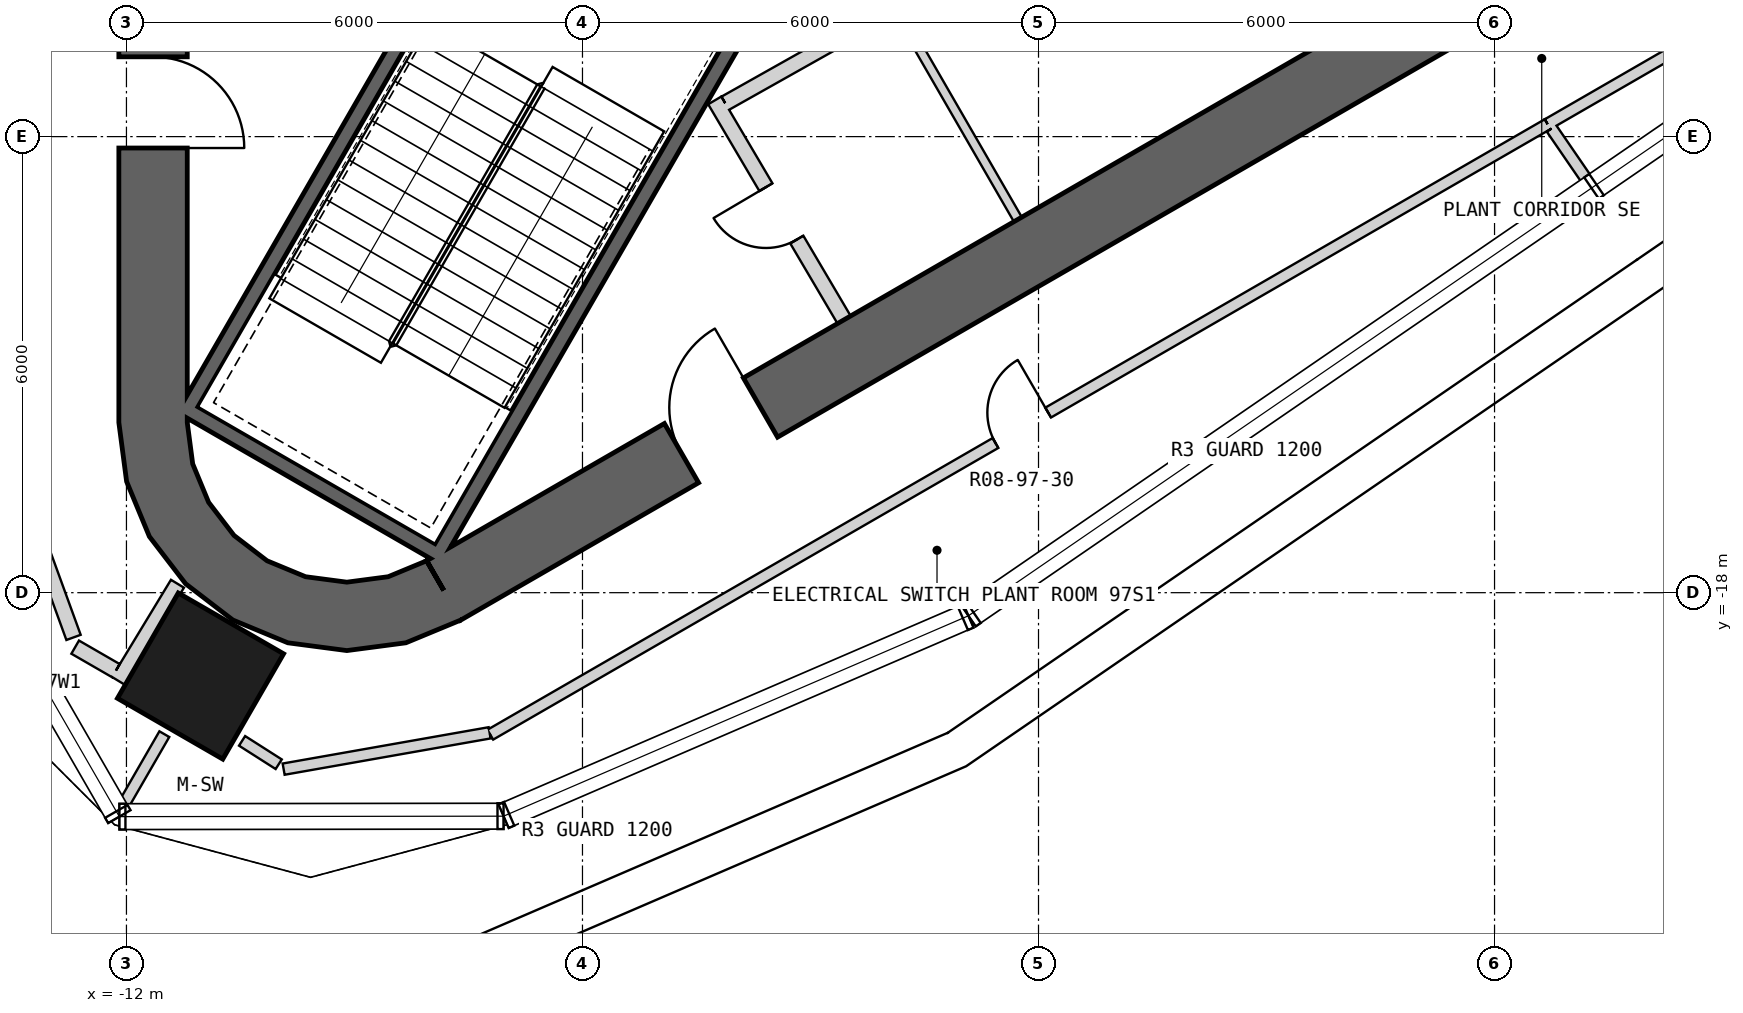
"""IFC4 building model, lengths in metres.
Left out: names, types, materials, properties, quantities, classifications, styles, units other than length and angle.
Written with IfcOpenShell. Run it as: python <this file> out.ifc"""

import sys

from ifc_helpers import new_model, si_unit, direction, frame, frame_2d, origin, origin_2d, place, context, subcontext, project, spatial, polyline, rectangle, outline, extrude, element, fill, save


model = new_model("IFC4")
c1 = context("Model", 3, precision=1e-05, world=origin(), true_north=direction((0.0, 1.0)))
c2 = subcontext(c1, "Body", "Model", "MODEL_VIEW")
j1 = project(units=[si_unit("LENGTHUNIT", "METRE"), si_unit("PLANEANGLEUNIT", "RADIAN")], contexts=[c1])
p1 = place(None, origin())
s1 = spatial("IfcSite", under=j1, at=p1, CompositionType="ELEMENT")
p2 = place(p1, origin())
s2 = spatial("IfcBuilding", under=s1, at=p2, CompositionType="ELEMENT")
p3 = place(p2, frame((0.0, 0.0, 430.3)))
s3 = spatial("IfcBuildingStorey", under=s2, at=p3, CompositionType="ELEMENT", Elevation=430.3)
p4 = place(p3, frame((-11.025, -19.097, 0.0), z_axis=(0.0, 0.0, 1.0), x_axis=(-0.5, -0.866025403784, 0.0)))
e1 = element("IfcColumn", 1, at=p4, inside=s3, PredefinedType="COLUMN", context=c2, shape_type="SweptSolid", body=[
    extrude(rectangle(XDim=1.6, YDim=1.6, at=origin_2d()), origin(), (0.0, 0.0, 1.0), 5.0),
])
p5 = place(p3, frame((-11.65, 15.762, 0.0), z_axis=(0.0, 0.0, 1.0), x_axis=(0.0, -1.0, 0.0)))
e2 = element("IfcWall", 2, at=p5, inside=s3, PredefinedType="SHEAR", context=c2, shape_type="SweptSolid", body=[
    extrude(rectangle(XDim=31.523, YDim=0.9, at=frame_2d((15.762, 0.0))), origin(), (0.0, 0.0, 1.0), 5.0),
])
p6 = place(p5, frame((3.612, 0.0, 0.0)))
e3 = element("IfcOpeningElement", 3, at=p6, cuts=e2, PredefinedType="OPENING", context=c2, shape_type="SweptSolid", body=[
    extrude(rectangle(XDim=1.2, YDim=2.4, at=frame_2d((0.6, 1.2))), frame((0.0, 0.46, 0.0), z_axis=(0.0, -1.0, 0.0), x_axis=(1.0, 0.0, 0.0)), (0.0, 0.0, 1.0), 0.92),
])
p7 = place(p5, frame((26.712, 0.0, 0.0)))
e4 = element("IfcOpeningElement", 4, at=p7, cuts=e2, PredefinedType="OPENING", context=c2, shape_type="SweptSolid", body=[
    extrude(rectangle(XDim=1.2, YDim=2.4, at=frame_2d((0.6, 1.2))), frame((0.0, 0.46, 0.0), z_axis=(0.0, -1.0, 0.0), x_axis=(1.0, 0.0, 0.0)), (0.0, 0.0, 1.0), 0.92),
])
p8 = place(p3, frame((-7.825, -17.97, 0.0), z_axis=(0.0, 0.0, 1.0), x_axis=(0.866028369851, 0.499994862586, 0.0)))
e5 = element("IfcWall", 5, at=p8, inside=s3, PredefinedType="SHEAR", context=c2, shape_type="SweptSolid", body=[
    extrude(rectangle(XDim=31.523, YDim=0.9, at=frame_2d((15.762, 0.0))), origin(), (0.0, 0.0, 1.0), 5.0),
])
p9 = place(p8, frame((17.862, 0.0, 0.0)))
e6 = element("IfcOpeningElement", 6, at=p9, cuts=e5, PredefinedType="OPENING", context=c2, shape_type="SweptSolid", body=[
    extrude(rectangle(XDim=1.2, YDim=2.4, at=frame_2d((0.6, 1.2))), frame((0.0, 0.46, 0.0), z_axis=(0.0, -1.0, 0.0), x_axis=(1.0, 0.0, 0.0)), (0.0, 0.0, 1.0), 0.92),
])
p10 = place(p8, frame((20.562, 0.0, 0.0)))
e7 = element("IfcOpeningElement", 7, at=p10, cuts=e5, PredefinedType="OPENING", context=c2, shape_type="SweptSolid", body=[
    extrude(rectangle(XDim=1.2, YDim=2.4, at=frame_2d((0.6, 1.2))), frame((0.0, 0.46, 0.0), z_axis=(0.0, -1.0, 0.0), x_axis=(1.0, 0.0, 0.0)), (0.0, 0.0, 1.0), 0.92),
])
p11 = place(p8, frame((26.712, 0.0, 0.0)))
e8 = element("IfcOpeningElement", 8, at=p11, cuts=e5, PredefinedType="OPENING", context=c2, shape_type="SweptSolid", body=[
    extrude(rectangle(XDim=1.2, YDim=2.4, at=frame_2d((0.6, 1.2))), frame((0.0, 0.46, 0.0), z_axis=(0.0, -1.0, 0.0), x_axis=(1.0, 0.0, 0.0)), (0.0, 0.0, 1.0), 0.92),
])
p12 = place(p8, frame((3.612, 0.0, 0.0)))
e9 = element("IfcOpeningElement", 9, at=p12, cuts=e5, PredefinedType="OPENING", context=c2, shape_type="SweptSolid", body=[
    extrude(rectangle(XDim=1.2, YDim=2.4, at=frame_2d((0.6, 1.2))), frame((0.0, 0.46, 0.0), z_axis=(0.0, -1.0, 0.0), x_axis=(1.0, 0.0, 0.0)), (0.0, 0.0, 1.0), 0.92),
])
p13 = place(p3, origin())
e10 = element("IfcWall", 10, at=p13, inside=s3, PredefinedType="SHEAR", context=c2, shape_type="SweptSolid", body=[
    extrude(outline(polyline([(-12.1, -15.762), (-11.998, -16.538), (-11.698, -17.262), (-11.221, -17.883), (-10.6, -18.36), (-9.876, -18.659), (-9.1, -18.762), (-8.323, -18.659), (-7.6, -18.36), (-8.05, -17.58), (-8.556, -17.79), (-9.1, -17.862), (-9.644, -17.79), (-10.15, -17.58), (-10.585, -17.247), (-10.919, -16.812), (-11.128, -16.305), (-11.2, -15.762), (-12.1, -15.762)])), origin(), (0.0, 0.0, 1.0), 5.0),
])
p14 = place(p3, frame((-3.905, -10.563, -0.25), z_axis=(0.0, 0.0, 1.0), x_axis=(-0.500012932018, -0.866017937352, 0.0)))
e11 = element("IfcWall", 11, at=p14, inside=s3, PredefinedType="SHEAR", context=c2, shape_type="SweptSolid", body=[
    extrude(rectangle(XDim=8.1, YDim=0.2, at=frame_2d((4.05, 0.0))), origin(), (0.0, 0.0, 1.0), 5.0),
])
p15 = place(p3, frame((-11.282, -15.541, -0.25), z_axis=(0.0, 0.0, 1.0), x_axis=(0.866000483506, -0.500043160704, 0.0)))
e12 = element("IfcWall", 12, at=p15, inside=s3, PredefinedType="SHEAR", context=c2, shape_type="SweptSolid", body=[
    extrude(rectangle(XDim=3.8, YDim=0.2, at=frame_2d((1.9, 0.0))), origin(), (0.0, 0.0, 1.0), 5.0),
])
p16 = place(p3, frame((-7.196, -8.663, -0.25), z_axis=(0.0, 0.0, 1.0), x_axis=(-0.499997992926, -0.866026562566, 0.0)))
e13 = element("IfcWall", 13, at=p16, inside=s3, PredefinedType="SHEAR", context=c2, shape_type="SweptSolid", body=[
    extrude(rectangle(XDim=7.9, YDim=0.2, at=frame_2d((3.95, 0.0))), origin(), (0.0, 0.0, 1.0), 5.0),
])
p17 = place(p3, frame((-1.897, -10.275, 0.0), z_axis=(0.0, 0.0, 1.0), x_axis=(0.499984717929, -0.866034226713, 0.0)))
e14 = element("IfcWall", 14, at=p17, inside=s3, PredefinedType="PARTITIONING", context=c2, shape_type="SweptSolid", body=[
    extrude(rectangle(XDim=3.25, YDim=0.12, at=frame_2d((1.625, 0.0))), origin(), (0.0, 0.0, 1.0), 4.75),
])
p18 = place(p3, frame((-4.26, -11.524, 0.0), z_axis=(0.0, 0.0, 1.0), x_axis=(0.507997497166, -0.861358544901, 0.0)))
e15 = element("IfcWall", 15, at=p18, inside=s3, PredefinedType="PARTITIONING", context=c2, shape_type="SweptSolid", body=[
    extrude(rectangle(XDim=3.35, YDim=0.2, at=frame_2d((1.675, 0.0))), origin(), (0.0, 0.0, 1.0), 4.75),
])
p19 = place(p18, frame((1.325, 0.0, 0.0)))
e16 = element("IfcOpeningElement", 16, at=p19, cuts=e15, PredefinedType="OPENING", context=c2, shape_type="SweptSolid", body=[
    extrude(rectangle(XDim=0.8, YDim=2.1, at=frame_2d((0.4, 1.05))), frame((0.0, 0.11, 0.0), z_axis=(0.0, -1.0, 0.0), x_axis=(1.0, 0.0, 0.0)), (0.0, 0.0, 1.0), 0.22),
])
p20 = place(p3, frame((-1.769, -10.237, 0.0), z_axis=(0.0, 0.0, 1.0), x_axis=(-0.871534483978, -0.490334215854, 0.0)))
e17 = element("IfcWall", 17, at=p20, inside=s3, PredefinedType="PARTITIONING", context=c2, shape_type="SweptSolid", body=[
    extrude(rectangle(XDim=2.7, YDim=0.2, at=frame_2d((1.35, 0.0))), origin(), (0.0, 0.0, 1.0), 4.75),
])
p21 = place(p3, frame((-12.104, -19.161, 0.0), z_axis=(0.0, 0.0, 1.0), x_axis=(0.518475368733, 0.855092563421, 0.0)))
e18 = element("IfcWall", 18, at=p21, inside=s3, PredefinedType="PARTITIONING", context=c2, shape_type="SweptSolid", body=[
    extrude(rectangle(XDim=1.496, YDim=0.2, at=frame_2d((0.748, 0.0))), origin(), (0.0, 0.0, 1.0), 4.75),
])
p22 = place(p3, frame((-12.675, -18.717, 0.0), z_axis=(0.0, 0.0, 1.0), x_axis=(0.866047486323, -0.49996174997, 0.0)))
e19 = element("IfcWall", 19, at=p22, inside=s3, PredefinedType="PARTITIONING", context=c2, shape_type="SweptSolid", body=[
    extrude(rectangle(XDim=0.618, YDim=0.2, at=frame_2d((0.309, 0.0))), origin(), (0.0, 0.0, 1.0), 4.75),
])
p23 = place(p3, frame((-13.634, -16.011, 0.0), z_axis=(0.0, 0.0, 1.0), x_axis=(0.342043269434, -0.939684203248, 0.0)))
e20 = element("IfcWall", 20, at=p23, inside=s3, PredefinedType="PARTITIONING", context=c2, shape_type="SweptSolid", body=[
    extrude(rectangle(XDim=2.742, YDim=0.2, at=frame_2d((1.371, 0.0))), origin(), (0.0, 0.0, 1.0), 4.75),
])
p24 = place(p3, frame((-11.501, -19.861, 0.0), z_axis=(0.0, 0.0, 1.0), x_axis=(-0.500107244371, -0.865963477364, 0.0)))
e21 = element("IfcWall", 21, at=p24, inside=s3, PredefinedType="PLUMBINGWALL", context=c2, shape_type="SweptSolid", body=[
    extrude(rectangle(XDim=1.098, YDim=0.15, at=frame_2d((0.549, 0.0))), origin(), (0.0, 0.0, 1.0), 3.93),
])
p25 = place(p3, frame((-7.213, -19.868, 0.0), z_axis=(0.0, 0.0, 1.0), x_axis=(0.866028156973, 0.499995231308, 0.0)))
e22 = element("IfcWall", 22, at=p25, inside=s3, PredefinedType="PLUMBINGWALL", context=c2, shape_type="SweptSolid", body=[
    extrude(rectangle(XDim=16.063, YDim=0.15, at=frame_2d((8.032, 0.0))), origin(), (0.0, 0.0, 1.0), 4.75),
])
p26 = place(p25, frame((7.675, 0.0, 0.0)))
e23 = element("IfcOpeningElement", 23, at=p26, cuts=e22, PredefinedType="OPENING", context=c2, shape_type="SweptSolid", body=[
    extrude(rectangle(XDim=0.8, YDim=2.1, at=frame_2d((0.4, 1.05))), frame((0.0, 0.085, 0.0), z_axis=(0.0, -1.0, 0.0), x_axis=(1.0, 0.0, 0.0)), (0.0, 0.0, 1.0), 0.17),
])
p27 = place(p3, frame((6.698, -11.837, 0.0), z_axis=(0.0, 0.0, 1.0), x_axis=(0.866022938386, 0.500004270171, 0.0)))
e24 = element("IfcWall", 24, at=p27, inside=s3, PredefinedType="PLUMBINGWALL", context=c2, shape_type="SweptSolid", body=[
    extrude(rectangle(XDim=16.148, YDim=0.15, at=frame_2d((8.074, 0.0))), origin(), (0.0, 0.0, 1.0), 4.75),
])
p28 = place(p27, frame((2.243, 0.0, 0.0)))
e25 = element("IfcOpeningElement", 25, at=p28, cuts=e24, PredefinedType="OPENING", context=c2, shape_type="SweptSolid", body=[
    extrude(rectangle(XDim=0.8, YDim=2.1, at=frame_2d((0.4, 1.05))), frame((0.0, 0.085, 0.0), z_axis=(0.0, -1.0, 0.0), x_axis=(1.0, 0.0, 0.0)), (0.0, 0.0, 1.0), 0.17),
])
p29 = place(p3, frame((-9.932, -20.322, 0.0), z_axis=(0.0, 0.0, 1.0), x_axis=(0.984813908974, 0.173613261856, 0.0)))
e26 = element("IfcWall", 26, at=p29, inside=s3, PredefinedType="PLUMBINGWALL", context=c2, shape_type="SweptSolid", body=[
    extrude(rectangle(XDim=2.752, YDim=0.15, at=frame_2d((1.376, 0.0))), origin(), (0.0, 0.0, 1.0), 4.75),
])
p30 = place(p3, frame((-10.479, -19.95, 0.0), z_axis=(0.0, 0.0, 1.0), x_axis=(0.843309487859, -0.537428234917, 0.0)))
e27 = element("IfcWall", 27, at=p30, inside=s3, PredefinedType="PLUMBINGWALL", context=c2, shape_type="SweptSolid", body=[
    extrude(rectangle(XDim=0.572, YDim=0.15, at=frame_2d((0.286, 0.0))), origin(), (0.0, 0.0, 1.0), 4.75),
])
p31 = place(p3, frame((7.213, -12.568, 0.0), z_axis=(0.0, 0.0, 1.0), x_axis=(-0.565933909506, 0.824450611056, 0.0)))
e28 = element("IfcWall", 28, at=p31, inside=s3, PredefinedType="PLUMBINGWALL", context=c2, shape_type="SweptSolid", body=[
    extrude(rectangle(XDim=0.819, YDim=0.15, at=frame_2d((0.409, 0.0))), origin(), (0.0, 0.0, 1.0), 4.75),
])
p32 = place(p19, origin())
e29 = element("IfcDoor", 29, at=p32, inside=s3, OperationType="SINGLE_SWING_LEFT", PredefinedType="USERDEFINED", context=c2, shape_type="SweptSolid", body=[
    extrude(rectangle(XDim=0.8, YDim=2.1, at=frame_2d((0.4, 1.05))), frame((0.0, 0.025, 0.0), z_axis=(0.0, -1.0, 0.0), x_axis=(1.0, 0.0, 0.0)), (0.0, 0.0, 1.0), 0.05),
])
fill(e16, e29)
p33 = place(p26, origin())
e30 = element("IfcDoor", 30, at=p33, inside=s3, OperationType="SINGLE_SWING_RIGHT", PredefinedType="USERDEFINED", context=c2, shape_type="SweptSolid", body=[
    extrude(rectangle(XDim=0.8, YDim=2.1, at=frame_2d((0.4, 1.05))), frame((0.0, 0.025, 0.0), z_axis=(0.0, -1.0, 0.0), x_axis=(1.0, 0.0, 0.0)), (0.0, 0.0, 1.0), 0.05),
])
fill(e23, e30)
p34 = place(p7, origin())
e31 = element("IfcDoor", 31, at=p34, inside=s3, OperationType="SINGLE_SWING_RIGHT", PredefinedType="USERDEFINED", context=c2, shape_type="SweptSolid", body=[
    extrude(rectangle(XDim=1.2, YDim=2.4, at=frame_2d((0.6, 1.2))), frame((0.0, 0.025, 0.0), z_axis=(0.0, -1.0, 0.0), x_axis=(1.0, 0.0, 0.0)), (0.0, 0.0, 1.0), 0.05),
])
fill(e4, e31)
p35 = place(p12, origin())
e32 = element("IfcDoor", 32, at=p35, inside=s3, OperationType="SINGLE_SWING_RIGHT", PredefinedType="USERDEFINED", context=c2, shape_type="SweptSolid", body=[
    extrude(rectangle(XDim=1.2, YDim=2.4, at=frame_2d((0.6, 1.2))), frame((0.0, 0.025, 0.0), z_axis=(0.0, -1.0, 0.0), x_axis=(1.0, 0.0, 0.0)), (0.0, 0.0, 1.0), 0.05),
])
fill(e9, e32)
save(model, sys.argv[1])
